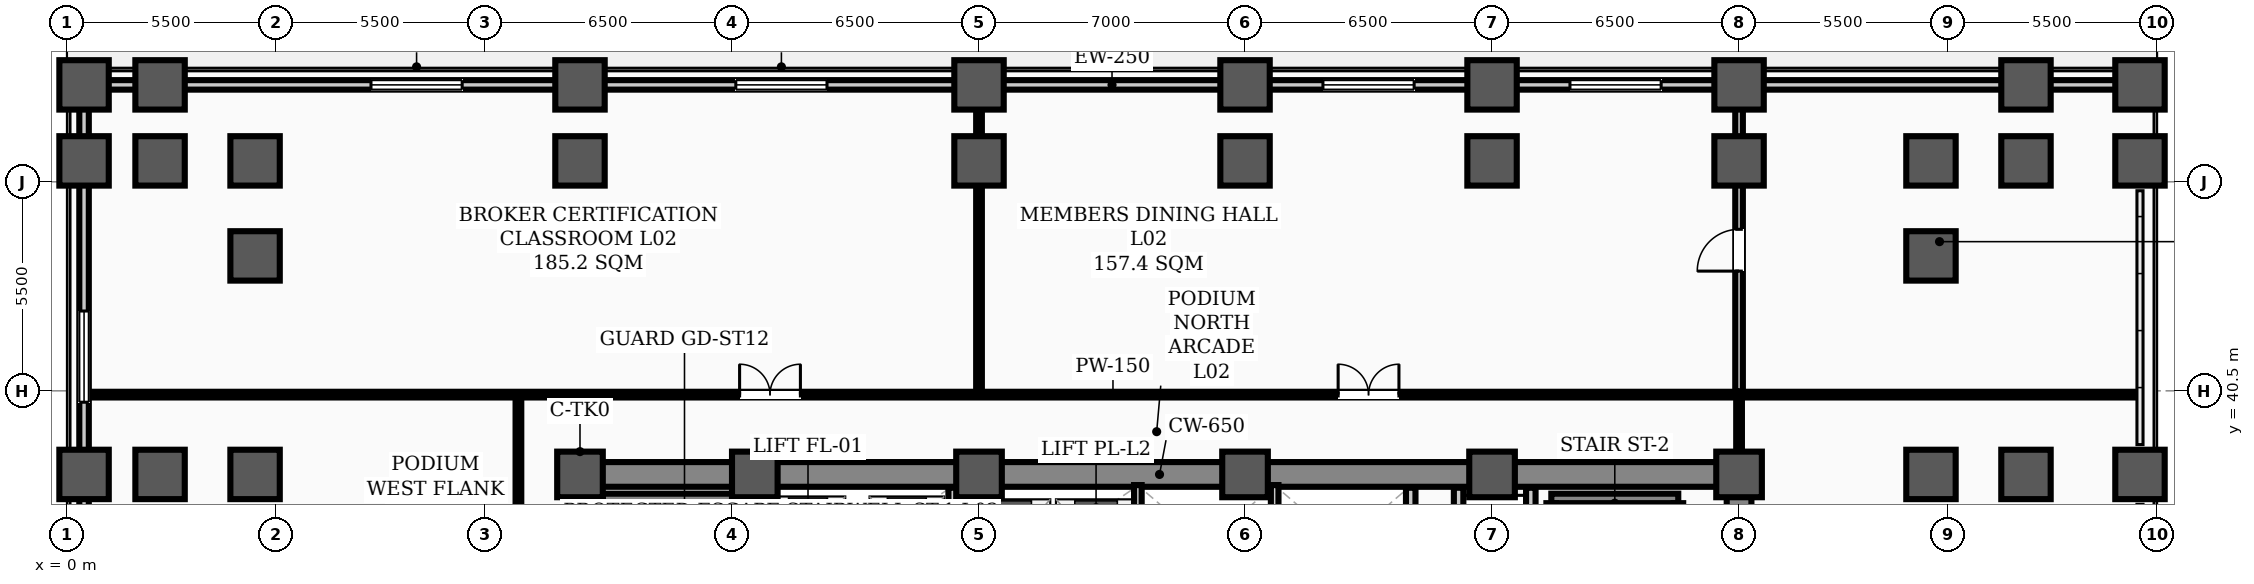
"""IFC4 building model, lengths in metres.
Left out: names, types, materials, properties, quantities, classifications, styles, units other than length and angle.
Written with IfcOpenShell. Run it as: python <this file> out.ifc"""

import sys

from ifc_helpers import new_model, si_unit, direction, frame, frame_2d, origin, origin_2d, place, context, subcontext, project, spatial, rectangle, hollow_rectangle, extrude, element, fill, save


model = new_model("IFC4")
c1 = context("Model", 3, precision=1e-05, world=origin(), true_north=direction((0.0, 1.0)))
c2 = subcontext(c1, "Body", "Model", "MODEL_VIEW")
j1 = project(units=[si_unit("LENGTHUNIT", "METRE"), si_unit("PLANEANGLEUNIT", "RADIAN")], contexts=[c1])
p1 = place(None, origin())
s1 = spatial("IfcSite", under=j1, at=p1, CompositionType="ELEMENT")
p2 = place(p1, origin())
s2 = spatial("IfcBuilding", under=s1, at=p2, CompositionType="ELEMENT")
p3 = place(p2, frame((0.0, 0.0, 5.8)))
s3 = spatial("IfcBuildingStorey", under=s2, at=p3, CompositionType="ELEMENT", Elevation=5.8)
for number, where, z_axis, x_axis in (
    (1, (13.5, 38.3, 0.0), (0.0, 0.0, 1.0), (1.0, 0.0, 0.0)),
    (2, (18.1, 38.3, 0.0), (0.0, 0.0, 1.0), (1.0, 0.0, 0.0)),
    (3, (24.0, 38.3, 0.0), (0.0, 0.0, 1.0), (1.0, 0.0, 0.0)),
    (4, (31.0, 38.3, 0.0), (0.0, 0.0, 1.0), (1.0, 0.0, 0.0)),
    (5, (37.5, 38.3, 0.0), (0.0, 0.0, 1.0), (1.0, 0.0, 0.0)),
    (6, (44.0, 38.3, 0.0), (0.0, 0.0, 1.0), (1.0, 0.0, 0.0)),
):
    element("IfcColumn", number, at=place(p3, frame(where, z_axis=z_axis, x_axis=x_axis)), inside=s3, PredefinedType="COLUMN", context=c2, shape_type="SweptSolid", body=[
        extrude(hollow_rectangle(XDim=1.2, YDim=1.2, WallThickness=0.04, InnerFilletRadius=0.02, OuterFilletRadius=0.06, at=origin_2d()), origin(), (0.0, 0.0, 1.0), 5.4),
    ])
for number, where, z_axis, x_axis in (
    (7, (0.45, 38.3, 0.0), (0.0, 0.0, 1.0), (1.0, 0.0, 0.0)),
    (8, (0.45, 46.55, 0.0), (0.0, 0.0, 1.0), (1.0, 0.0, 0.0)),
    (9, (0.45, 48.55, 0.0), (0.0, 0.0, 1.0), (1.0, 0.0, 0.0)),
    (10, (2.45, 38.3, 0.0), (0.0, 0.0, 1.0), (1.0, 0.0, 0.0)),
    (11, (2.45, 46.55, 0.0), (0.0, 0.0, 1.0), (1.0, 0.0, 0.0)),
    (12, (2.45, 48.55, 0.0), (0.0, 0.0, 1.0), (1.0, 0.0, 0.0)),
    (13, (4.95, 38.3, 0.0), (0.0, 0.0, 1.0), (1.0, 0.0, 0.0)),
    (14, (4.95, 44.05, 0.0), (0.0, 0.0, 1.0), (1.0, 0.0, 0.0)),
    (15, (4.95, 46.55, 0.0), (0.0, 0.0, 1.0), (1.0, 0.0, 0.0)),
    (16, (13.5, 46.55, 0.0), (0.0, 0.0, 1.0), (1.0, 0.0, 0.0)),
    (17, (13.5, 48.55, 0.0), (0.0, 0.0, 1.0), (1.0, 0.0, 0.0)),
    (18, (24.0, 46.55, 0.0), (0.0, 0.0, 1.0), (1.0, 0.0, 0.0)),
    (19, (24.0, 48.55, 0.0), (0.0, 0.0, 1.0), (1.0, 0.0, 0.0)),
    (20, (31.0, 46.55, 0.0), (0.0, 0.0, 1.0), (1.0, 0.0, 0.0)),
    (21, (31.0, 48.55, 0.0), (0.0, 0.0, 1.0), (1.0, 0.0, 0.0)),
    (22, (37.5, 46.55, 0.0), (0.0, 0.0, 1.0), (1.0, 0.0, 0.0)),
    (23, (37.5, 48.55, 0.0), (0.0, 0.0, 1.0), (1.0, 0.0, 0.0)),
    (24, (44.0, 46.55, 0.0), (0.0, 0.0, 1.0), (1.0, 0.0, 0.0)),
    (25, (44.0, 48.55, 0.0), (0.0, 0.0, 1.0), (1.0, 0.0, 0.0)),
    (26, (49.05, 38.3, 0.0), (0.0, 0.0, 1.0), (1.0, 0.0, 0.0)),
    (27, (49.05, 44.05, 0.0), (0.0, 0.0, 1.0), (1.0, 0.0, 0.0)),
    (28, (49.05, 46.55, 0.0), (0.0, 0.0, 1.0), (1.0, 0.0, 0.0)),
    (29, (51.55, 38.3, 0.0), (0.0, 0.0, 1.0), (1.0, 0.0, 0.0)),
    (30, (51.55, 46.55, 0.0), (0.0, 0.0, 1.0), (1.0, 0.0, 0.0)),
    (31, (51.55, 48.55, 0.0), (0.0, 0.0, 1.0), (1.0, 0.0, 0.0)),
    (32, (54.55, 38.3, 0.0), (0.0, 0.0, 1.0), (1.0, 0.0, 0.0)),
    (33, (54.55, 46.55, 0.0), (0.0, 0.0, 1.0), (1.0, 0.0, 0.0)),
    (34, (54.55, 48.55, 0.0), (0.0, 0.0, 1.0), (1.0, 0.0, 0.0)),
):
    element("IfcColumn", number, at=place(p3, frame(where, z_axis=z_axis, x_axis=x_axis)), inside=s3, PredefinedType="COLUMN", context=c2, shape_type="SweptSolid", body=[
        extrude(rectangle(XDim=1.3, YDim=1.3, at=origin_2d()), origin(), (0.0, 0.0, 1.0), 5.4),
    ])
p4 = place(p3, frame((0.45, 48.55, 0.0), z_axis=(0.0, 0.0, 1.0), x_axis=(1.0, 0.0, 0.0)))
e35 = element("IfcWall", 35, at=p4, inside=s3, PredefinedType="STANDARD", context=c2, shape_type="SweptSolid", body=[
    extrude(rectangle(XDim=54.1, YDim=0.25, at=frame_2d((27.05, 0.0))), origin(), (0.0, 0.0, 1.0), 4.37),
])
p5 = place(p4, frame((7.55, 0.0, 0.9)))
e36 = element("IfcOpeningElement", 36, at=p5, cuts=e35, PredefinedType="OPENING", context=c2, shape_type="SweptSolid", body=[
    extrude(rectangle(XDim=2.4, YDim=2.1, at=frame_2d((1.2, 1.05))), frame((0.0, 0.135, 0.0), z_axis=(0.0, -1.0, 0.0), x_axis=(1.0, 0.0, 0.0)), (0.0, 0.0, 1.0), 0.27),
])
p6 = place(p4, frame((17.15, 0.0, 0.9)))
e37 = element("IfcOpeningElement", 37, at=p6, cuts=e35, PredefinedType="OPENING", context=c2, shape_type="SweptSolid", body=[
    extrude(rectangle(XDim=2.4, YDim=2.1, at=frame_2d((1.2, 1.05))), frame((0.0, 0.135, 0.0), z_axis=(0.0, -1.0, 0.0), x_axis=(1.0, 0.0, 0.0)), (0.0, 0.0, 1.0), 0.27),
])
p7 = place(p4, frame((32.6, 0.0, 0.9)))
e38 = element("IfcOpeningElement", 38, at=p7, cuts=e35, PredefinedType="OPENING", context=c2, shape_type="SweptSolid", body=[
    extrude(rectangle(XDim=2.4, YDim=2.1, at=frame_2d((1.2, 1.05))), frame((0.0, 0.135, 0.0), z_axis=(0.0, -1.0, 0.0), x_axis=(1.0, 0.0, 0.0)), (0.0, 0.0, 1.0), 0.27),
])
p8 = place(p4, frame((39.1, 0.0, 0.9)))
e39 = element("IfcOpeningElement", 39, at=p8, cuts=e35, PredefinedType="OPENING", context=c2, shape_type="SweptSolid", body=[
    extrude(rectangle(XDim=2.4, YDim=2.1, at=frame_2d((1.2, 1.05))), frame((0.0, 0.135, 0.0), z_axis=(0.0, -1.0, 0.0), x_axis=(1.0, 0.0, 0.0)), (0.0, 0.0, 1.0), 0.27),
])
p9 = place(p3, frame((0.45, 3.45, 0.0), z_axis=(0.0, 0.0, 1.0), x_axis=(0.0, 1.0, 0.0)))
e40 = element("IfcWall", 40, at=p9, inside=s3, PredefinedType="STANDARD", context=c2, shape_type="SweptSolid", body=[
    extrude(rectangle(XDim=45.1, YDim=0.25, at=frame_2d((22.55, 0.0))), origin(), (0.0, 0.0, 1.0), 4.37),
])
p10 = place(p9, frame((4.8, 0.0, 0.9)))
e41 = element("IfcOpeningElement", 41, at=p10, cuts=e40, PredefinedType="OPENING", context=c2, shape_type="SweptSolid", body=[
    extrude(rectangle(XDim=2.4, YDim=2.1, at=frame_2d((1.2, 1.05))), frame((0.0, 0.135, 0.0), z_axis=(0.0, -1.0, 0.0), x_axis=(1.0, 0.0, 0.0)), (0.0, 0.0, 1.0), 0.27),
])
p11 = place(p9, frame((19.85, 0.0, 0.9)))
e42 = element("IfcOpeningElement", 42, at=p11, cuts=e40, PredefinedType="OPENING", context=c2, shape_type="SweptSolid", body=[
    extrude(rectangle(XDim=2.4, YDim=2.1, at=frame_2d((1.2, 1.05))), frame((0.0, 0.135, 0.0), z_axis=(0.0, -1.0, 0.0), x_axis=(1.0, 0.0, 0.0)), (0.0, 0.0, 1.0), 0.27),
])
p12 = place(p9, frame((29.0, 0.0, 0.9)))
e43 = element("IfcOpeningElement", 43, at=p12, cuts=e40, PredefinedType="OPENING", context=c2, shape_type="SweptSolid", body=[
    extrude(rectangle(XDim=2.4, YDim=2.1, at=frame_2d((1.2, 1.05))), frame((0.0, 0.135, 0.0), z_axis=(0.0, -1.0, 0.0), x_axis=(1.0, 0.0, 0.0)), (0.0, 0.0, 1.0), 0.27),
])
p13 = place(p9, frame((36.75, 0.0, 0.9)))
e44 = element("IfcOpeningElement", 44, at=p13, cuts=e40, PredefinedType="OPENING", context=c2, shape_type="SweptSolid", body=[
    extrude(rectangle(XDim=2.4, YDim=2.1, at=frame_2d((1.2, 1.05))), frame((0.0, 0.135, 0.0), z_axis=(0.0, -1.0, 0.0), x_axis=(1.0, 0.0, 0.0)), (0.0, 0.0, 1.0), 0.27),
])
p14 = place(p3, frame((13.5, 38.3, 0.0), z_axis=(0.0, 0.0, 1.0), x_axis=(1.0, 0.0, 0.0)))
e45 = element("IfcWall", 45, at=p14, inside=s3, PredefinedType="SHEAR", context=c2, shape_type="SweptSolid", body=[
    extrude(rectangle(XDim=30.5, YDim=0.65, at=frame_2d((15.25, 0.0))), origin(), (0.0, 0.0, 1.0), 5.15),
])
for number, where, z_axis, x_axis in (
    (46, (13.5, 29.35, 0.0), (0.0, 0.0, 1.0), (0.0, 1.0, 0.0)),
    (47, (44.0, 29.35, 0.0), (0.0, 0.0, 1.0), (0.0, 1.0, 0.0)),
):
    element("IfcWall", number, at=place(p3, frame(where, z_axis=z_axis, x_axis=x_axis)), inside=s3, PredefinedType="SHEAR", context=c2, shape_type="SweptSolid", body=[
        extrude(rectangle(XDim=8.6, YDim=0.65, at=frame_2d((4.3, 0.0))), origin(), (0.0, 0.0, 1.0), 5.15),
    ])
p15 = place(p3, frame((14.1, 37.669, 0.0), z_axis=(0.0, 0.0, 1.0), x_axis=(1.0, 0.0, 0.0)))
e48 = element("IfcWall", 48, at=p15, inside=s3, PredefinedType="STANDARD", context=c2, shape_type="SweptSolid", body=[
    extrude(rectangle(XDim=3.67, YDim=0.25, at=frame_2d((1.835, 0.0))), origin(), (0.0, 0.0, 1.0), 5.15),
])
for number, where, z_axis, x_axis in (
    (49, (14.425, 30.36, 0.0), (0.0, 0.0, 1.0), (0.0, 1.0, 0.0)),
    (50, (17.775, 30.36, 0.0), (0.0, 0.0, 1.0), (0.0, 1.0, 0.0)),
):
    element("IfcWall", number, at=place(p3, frame(where, z_axis=z_axis, x_axis=x_axis)), inside=s3, PredefinedType="STANDARD", context=c2, shape_type="SweptSolid", body=[
        extrude(rectangle(XDim=7.184, YDim=0.25, at=frame_2d((3.592, 0.0))), origin(), (0.0, 0.0, 1.0), 5.15),
    ])
p16 = place(p3, frame((39.06, 37.669, 0.0), z_axis=(0.0, 0.0, 1.0), x_axis=(1.0, 0.0, 0.0)))
e51 = element("IfcWall", 51, at=p16, inside=s3, PredefinedType="STANDARD", context=c2, shape_type="SweptSolid", body=[
    extrude(rectangle(XDim=3.34, YDim=0.25, at=frame_2d((1.67, 0.0))), origin(), (0.0, 0.0, 1.0), 5.15),
])
for number, where, z_axis, x_axis in (
    (52, (39.055, 30.36, 0.0), (0.0, 0.0, 1.0), (0.0, 1.0, 0.0)),
    (53, (42.405, 30.36, 0.0), (0.0, 0.0, 1.0), (0.0, 1.0, 0.0)),
):
    element("IfcWall", number, at=place(p3, frame(where, z_axis=z_axis, x_axis=x_axis)), inside=s3, PredefinedType="STANDARD", context=c2, shape_type="SweptSolid", body=[
        extrude(rectangle(XDim=7.184, YDim=0.25, at=frame_2d((3.592, 0.0))), origin(), (0.0, 0.0, 1.0), 5.15),
    ])
p17 = place(p3, frame((36.62, 31.95, 0.0), z_axis=(0.0, 0.0, 1.0), x_axis=(0.0, 1.0, 0.0)))
e54 = element("IfcWall", 54, at=p17, inside=s3, PredefinedType="STANDARD", context=c2, shape_type="SweptSolid", body=[
    extrude(rectangle(XDim=6.0, YDim=0.25, at=frame_2d((3.0, 0.0))), origin(), (0.0, 0.0, 1.0), 4.33),
])
p18 = place(p17, frame((0.9, 0.0, 0.0)))
e55 = element("IfcOpeningElement", 55, at=p18, cuts=e54, PredefinedType="OPENING", context=c2, shape_type="SweptSolid", body=[
    extrude(rectangle(XDim=1.1, YDim=2.08, at=frame_2d((0.55, 1.04))), frame((0.0, 0.135, 0.0), z_axis=(0.0, -1.0, 0.0), x_axis=(1.0, 0.0, 0.0)), (0.0, 0.0, 1.0), 0.27),
])
p19 = place(p17, frame((4.0, 0.0, 0.0)))
e56 = element("IfcOpeningElement", 56, at=p19, cuts=e54, PredefinedType="OPENING", context=c2, shape_type="SweptSolid", body=[
    extrude(rectangle(XDim=1.1, YDim=2.08, at=frame_2d((0.55, 1.04))), frame((0.0, 0.135, 0.0), z_axis=(0.0, -1.0, 0.0), x_axis=(1.0, 0.0, 0.0)), (0.0, 0.0, 1.0), 0.27),
])
p20 = place(p3, frame((38.52, 31.95, 0.0), z_axis=(0.0, 0.0, 1.0), x_axis=(0.0, 1.0, 0.0)))
e57 = element("IfcWall", 57, at=p20, inside=s3, PredefinedType="STANDARD", context=c2, shape_type="SweptSolid", body=[
    extrude(rectangle(XDim=6.0, YDim=0.25, at=frame_2d((3.0, 0.0))), origin(), (0.0, 0.0, 1.0), 4.33),
])
for number, where, z_axis, x_axis in (
    (58, (18.28, 34.62, 0.0), (0.0, 0.0, 1.0), (0.0, 1.0, 0.0)),
    (59, (23.32, 34.62, 0.0), (0.0, 0.0, 1.0), (0.0, 1.0, 0.0)),
):
    element("IfcWall", number, at=place(p3, frame(where, z_axis=z_axis, x_axis=x_axis)), inside=s3, PredefinedType="STANDARD", context=c2, shape_type="SweptSolid", body=[
        extrude(rectangle(XDim=3.33, YDim=0.25, at=frame_2d((1.665, 0.0))), origin(), (0.0, 0.0, 1.0), 4.33),
    ])
p21 = place(p3, frame((35.36, 34.9, 0.0), z_axis=(0.0, 0.0, 1.0), x_axis=(0.0, 1.0, 0.0)))
e60 = element("IfcWall", 60, at=p21, inside=s3, PredefinedType="STANDARD", context=c2, shape_type="SweptSolid", body=[
    extrude(rectangle(XDim=3.05, YDim=0.25, at=frame_2d((1.525, 0.0))), origin(), (0.0, 0.0, 1.0), 4.33),
])
p22 = place(p3, frame((0.58, 40.4, 0.0), z_axis=(0.0, 0.0, 1.0), x_axis=(1.0, 0.0, 0.0)))
e61 = element("IfcWall", 61, at=p22, inside=s3, PredefinedType="PARTITIONING", context=c2, shape_type="SweptSolid", body=[
    extrude(rectangle(XDim=53.89, YDim=0.15, at=frame_2d((26.945, 0.0))), origin(), (0.0, 0.0, 1.0), 4.43),
])
p23 = place(p22, frame((17.12, 0.0, 0.0)))
e62 = element("IfcOpeningElement", 62, at=p23, cuts=e61, PredefinedType="OPENING", context=c2, shape_type="SweptSolid", body=[
    extrude(rectangle(XDim=1.6, YDim=2.08, at=frame_2d((0.8, 1.04))), frame((0.0, 0.085, 0.0), z_axis=(0.0, -1.0, 0.0), x_axis=(1.0, 0.0, 0.0)), (0.0, 0.0, 1.0), 0.17),
])
p24 = place(p22, frame((32.87, 0.0, 0.0)))
e63 = element("IfcOpeningElement", 63, at=p24, cuts=e61, PredefinedType="OPENING", context=c2, shape_type="SweptSolid", body=[
    extrude(rectangle(XDim=1.6, YDim=2.08, at=frame_2d((0.8, 1.04))), frame((0.0, 0.085, 0.0), z_axis=(0.0, -1.0, 0.0), x_axis=(1.0, 0.0, 0.0)), (0.0, 0.0, 1.0), 0.17),
])
p25 = place(p3, frame((11.88, 28.15, 0.0), z_axis=(0.0, 0.0, 1.0), x_axis=(0.0, 1.0, 0.0)))
e64 = element("IfcWall", 64, at=p25, inside=s3, PredefinedType="PARTITIONING", context=c2, shape_type="SweptSolid", body=[
    extrude(rectangle(XDim=12.165, YDim=0.15, at=frame_2d((6.083, 0.0))), origin(), (0.0, 0.0, 1.0), 4.33),
])
p26 = place(p3, frame((24.0, 40.485, 0.0), z_axis=(0.0, 0.0, 1.0), x_axis=(0.0, 1.0, 0.0)))
e65 = element("IfcWall", 65, at=p26, inside=s3, PredefinedType="PARTITIONING", context=c2, shape_type="SweptSolid", body=[
    extrude(rectangle(XDim=7.935, YDim=0.15, at=frame_2d((3.967, 0.0))), origin(), (0.0, 0.0, 1.0), 4.33),
])
p27 = place(p3, frame((44.0, 40.485, 0.0), z_axis=(0.0, 0.0, 1.0), x_axis=(0.0, 1.0, 0.0)))
e66 = element("IfcWall", 66, at=p27, inside=s3, PredefinedType="STANDARD", context=c2, shape_type="SweptSolid", body=[
    extrude(rectangle(XDim=7.935, YDim=0.2, at=frame_2d((3.967, 0.0))), origin(), (0.0, 0.0, 1.0), 4.33),
])
p28 = place(p27, frame((3.165, 0.0, 0.0)))
e67 = element("IfcOpeningElement", 67, at=p28, cuts=e66, PredefinedType="OPENING", context=c2, shape_type="SweptSolid", body=[
    extrude(rectangle(XDim=1.1, YDim=2.08, at=frame_2d((0.55, 1.04))), frame((0.0, 0.11, 0.0), z_axis=(0.0, -1.0, 0.0), x_axis=(1.0, 0.0, 0.0)), (0.0, 0.0, 1.0), 0.22),
])
p29 = place(p3, frame((44.0, 38.635, 0.0), z_axis=(0.0, 0.0, 1.0), x_axis=(0.0, 1.0, 0.0)))
e68 = element("IfcWall", 68, at=p29, inside=s3, PredefinedType="PARTITIONING", context=c2, shape_type="SweptSolid", body=[
    extrude(rectangle(XDim=1.68, YDim=0.15, at=frame_2d((0.84, 0.0))), origin(), (0.0, 0.0, 1.0), 4.33),
])
for number, where, z_axis, x_axis in (
    (69, (23.72, 34.9, 0.0), (0.0, 0.0, 1.0), (0.0, 1.0, 0.0)),
    (70, (28.18, 34.9, 0.0), (0.0, 0.0, 1.0), (0.0, 1.0, 0.0)),
    (71, (31.78, 34.9, 0.0), (0.0, 0.0, 1.0), (0.0, 1.0, 0.0)),
):
    element("IfcWall", number, at=place(p3, frame(where, z_axis=z_axis, x_axis=x_axis)), inside=s3, PredefinedType="STANDARD", context=c2, shape_type="SweptSolid", body=[
        extrude(rectangle(XDim=3.12, YDim=0.2, at=frame_2d((1.56, 0.0))), origin(), (0.0, 0.0, 1.0), 4.33),
    ])
p30 = place(p5, origin())
e72 = element("IfcWindow", 72, at=p30, inside=s3, PartitioningType="SINGLE_PANEL", PredefinedType="WINDOW", context=c2, shape_type="SweptSolid", body=[
    extrude(rectangle(XDim=2.4, YDim=2.1, at=frame_2d((1.2, 1.05))), frame((0.0, 0.03, 0.0), z_axis=(0.0, -1.0, 0.0), x_axis=(1.0, 0.0, 0.0)), (0.0, 0.0, 1.0), 0.06),
])
fill(e36, e72)
p31 = place(p6, origin())
e73 = element("IfcWindow", 73, at=p31, inside=s3, PartitioningType="SINGLE_PANEL", PredefinedType="WINDOW", context=c2, shape_type="SweptSolid", body=[
    extrude(rectangle(XDim=2.4, YDim=2.1, at=frame_2d((1.2, 1.05))), frame((0.0, 0.03, 0.0), z_axis=(0.0, -1.0, 0.0), x_axis=(1.0, 0.0, 0.0)), (0.0, 0.0, 1.0), 0.06),
])
fill(e37, e73)
p32 = place(p7, origin())
e74 = element("IfcWindow", 74, at=p32, inside=s3, PartitioningType="SINGLE_PANEL", PredefinedType="WINDOW", context=c2, shape_type="SweptSolid", body=[
    extrude(rectangle(XDim=2.4, YDim=2.1, at=frame_2d((1.2, 1.05))), frame((0.0, 0.03, 0.0), z_axis=(0.0, -1.0, 0.0), x_axis=(1.0, 0.0, 0.0)), (0.0, 0.0, 1.0), 0.06),
])
fill(e38, e74)
p33 = place(p8, origin())
e75 = element("IfcWindow", 75, at=p33, inside=s3, PartitioningType="SINGLE_PANEL", PredefinedType="WINDOW", context=c2, shape_type="SweptSolid", body=[
    extrude(rectangle(XDim=2.4, YDim=2.1, at=frame_2d((1.2, 1.05))), frame((0.0, 0.03, 0.0), z_axis=(0.0, -1.0, 0.0), x_axis=(1.0, 0.0, 0.0)), (0.0, 0.0, 1.0), 0.06),
])
fill(e39, e75)
p34 = place(p13, origin())
e76 = element("IfcWindow", 76, at=p34, inside=s3, PartitioningType="SINGLE_PANEL", PredefinedType="WINDOW", context=c2, shape_type="SweptSolid", body=[
    extrude(rectangle(XDim=2.4, YDim=2.1, at=frame_2d((1.2, 1.05))), frame((0.0, 0.03, 0.0), z_axis=(0.0, -1.0, 0.0), x_axis=(1.0, 0.0, 0.0)), (0.0, 0.0, 1.0), 0.06),
])
fill(e44, e76)
p35 = place(p23, origin())
e77 = element("IfcDoor", 77, at=p35, inside=s3, OperationType="DOUBLE_DOOR_SINGLE_SWING", PredefinedType="DOOR", context=c2, shape_type="SweptSolid", body=[
    extrude(rectangle(XDim=1.6, YDim=2.08, at=frame_2d((0.8, 1.04))), frame((0.0, 0.025, 0.0), z_axis=(0.0, -1.0, 0.0), x_axis=(1.0, 0.0, 0.0)), (0.0, 0.0, 1.0), 0.05),
])
fill(e62, e77)
p36 = place(p24, origin())
e78 = element("IfcDoor", 78, at=p36, inside=s3, OperationType="DOUBLE_DOOR_SINGLE_SWING", PredefinedType="DOOR", context=c2, shape_type="SweptSolid", body=[
    extrude(rectangle(XDim=1.6, YDim=2.08, at=frame_2d((0.8, 1.04))), frame((0.0, 0.025, 0.0), z_axis=(0.0, -1.0, 0.0), x_axis=(1.0, 0.0, 0.0)), (0.0, 0.0, 1.0), 0.05),
])
fill(e63, e78)
p37 = place(p28, origin())
e79 = element("IfcDoor", 79, at=p37, inside=s3, OperationType="SINGLE_SWING_LEFT", PredefinedType="DOOR", context=c2, shape_type="SweptSolid", body=[
    extrude(rectangle(XDim=1.1, YDim=2.08, at=frame_2d((0.55, 1.04))), frame((0.0, 0.025, 0.0), z_axis=(0.0, -1.0, 0.0), x_axis=(1.0, 0.0, 0.0)), (0.0, 0.0, 1.0), 0.05),
])
fill(e67, e79)
save(model, sys.argv[1])
